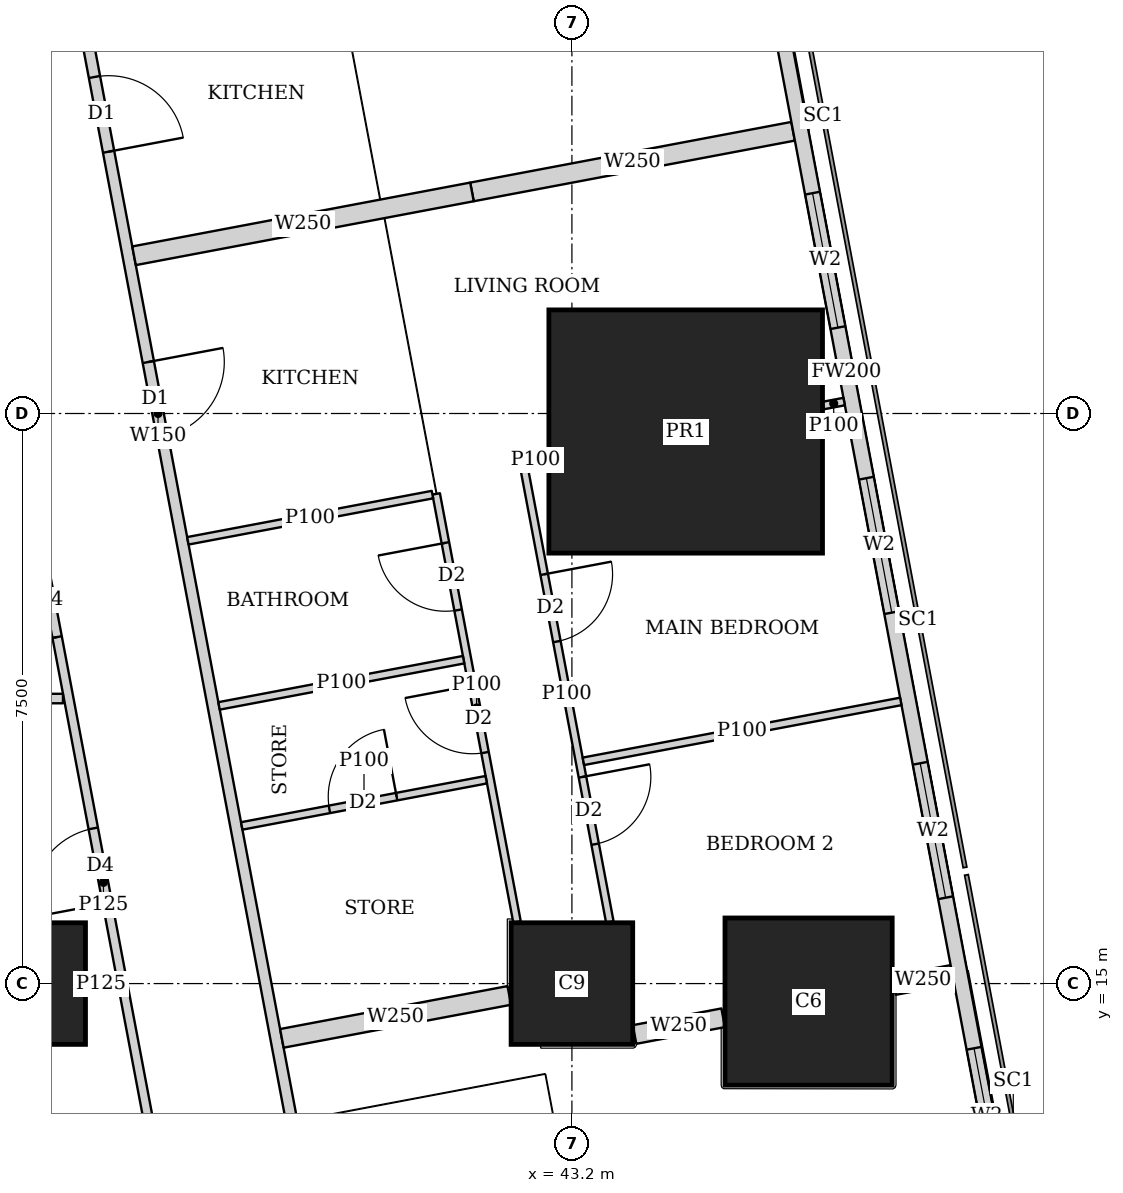
"""IFC4 building model, lengths in metres.
Left out: names, types, materials, properties, quantities, classifications, styles, units other than length and angle.
Written with IfcOpenShell. Run it as: python <this file> out.ifc"""

import sys

from ifc_helpers import new_model, si_unit, direction, frame, frame_2d, origin, origin_2d, place, context, subcontext, project, spatial, rectangle, extrude, element, fill, save


model = new_model("IFC4")
c1 = context("Model", 3, precision=1e-05, world=origin(), true_north=direction((0.0, 1.0)))
c2 = subcontext(c1, "Body", "Model", "MODEL_VIEW")
j1 = project(units=[si_unit("LENGTHUNIT", "METRE"), si_unit("PLANEANGLEUNIT", "RADIAN")], contexts=[c1])
p1 = place(None, origin())
s1 = spatial("IfcSite", under=j1, at=p1, CompositionType="ELEMENT")
p2 = place(p1, origin())
s2 = spatial("IfcBuilding", under=s1, at=p2, CompositionType="ELEMENT")
p3 = place(p2, frame((0.0, 0.0, 81.65)))
s3 = spatial("IfcBuildingStorey", under=s2, at=p3, CompositionType="ELEMENT", Elevation=81.65)
for number, where, z_axis, x_axis in (
    (1, (36.0, 15.0, 0.0), (0.0, 0.0, 1.0), (1.0, 0.0, 0.0)),
    (2, (43.2, 15.0, 0.0), (0.0, 0.0, 1.0), (1.0, 0.0, 0.0)),
):
    element("IfcColumn", number, at=place(p3, frame(where, z_axis=z_axis, x_axis=x_axis)), inside=s3, PredefinedType="COLUMN", context=c2, shape_type="SweptSolid", body=[
        extrude(rectangle(XDim=1.6, YDim=1.6, at=origin_2d()), origin(), (0.0, 0.0, 1.0), 3.75),
    ])
p4 = place(p3, frame((46.314, 14.763, 0.0), z_axis=(0.0, 0.0, 1.0), x_axis=(1.0, 0.0, 0.0)))
e3 = element("IfcColumn", 3, at=p4, inside=s3, PredefinedType="COLUMN", context=c2, shape_type="SweptSolid", body=[
    extrude(rectangle(XDim=2.2, YDim=2.2, at=origin_2d()), origin(), (0.0, 0.0, 1.0), 3.75),
])
p5 = place(p3, frame((44.697, 22.263, 0.0), z_axis=(0.0, 0.0, 1.0), x_axis=(1.0, 0.0, 0.0)))
e4 = element("IfcColumn", 4, at=p5, inside=s3, PredefinedType="COLUMN", context=c2, shape_type="SweptSolid", body=[
    extrude(rectangle(XDim=3.6, YDim=3.2, at=origin_2d()), origin(), (0.0, 0.0, 1.0), 3.75),
])
p6 = place(p3, frame((50.653, 2.703, 0.0), z_axis=(0.0, 0.0, 1.0), x_axis=(-0.185612026696, 0.982623109613, 0.0)))
e5 = element("IfcWall", 5, at=p6, inside=s3, PredefinedType="SOLIDWALL", context=c2, shape_type="SweptSolid", body=[
    extrude(rectangle(XDim=41.393, YDim=0.2, at=frame_2d((20.697, 0.0))), origin(), (0.0, 0.0, 1.0), 3.5),
])
p7 = place(p6, frame((1.633, 0.0, 0.9)))
e6 = element("IfcOpeningElement", 6, at=p7, cuts=e5, PredefinedType="OPENING", context=c2, shape_type="SweptSolid", body=[
    extrude(rectangle(XDim=1.8, YDim=1.5, at=frame_2d((0.9, 0.75))), frame((0.0, 0.11, 0.0), z_axis=(0.0, -1.0, 0.0), x_axis=(1.0, 0.0, 0.0)), (0.0, 0.0, 1.0), 0.22),
])
p8 = place(p6, frame((6.032, 0.0, 0.9)))
e7 = element("IfcOpeningElement", 7, at=p8, cuts=e5, PredefinedType="OPENING", context=c2, shape_type="SweptSolid", body=[
    extrude(rectangle(XDim=1.8, YDim=1.5, at=frame_2d((0.9, 0.75))), frame((0.0, 0.11, 0.0), z_axis=(0.0, -1.0, 0.0), x_axis=(1.0, 0.0, 0.0)), (0.0, 0.0, 1.0), 0.22),
])
p9 = place(p6, frame((9.848, 0.0, 0.9)))
e8 = element("IfcOpeningElement", 8, at=p9, cuts=e5, PredefinedType="OPENING", context=c2, shape_type="SweptSolid", body=[
    extrude(rectangle(XDim=1.8, YDim=1.5, at=frame_2d((0.9, 0.75))), frame((0.0, 0.11, 0.0), z_axis=(0.0, -1.0, 0.0), x_axis=(1.0, 0.0, 0.0)), (0.0, 0.0, 1.0), 0.22),
])
p10 = place(p6, frame((13.664, 0.0, 0.9)))
e9 = element("IfcOpeningElement", 9, at=p10, cuts=e5, PredefinedType="OPENING", context=c2, shape_type="SweptSolid", body=[
    extrude(rectangle(XDim=1.8, YDim=1.5, at=frame_2d((0.9, 0.75))), frame((0.0, 0.11, 0.0), z_axis=(0.0, -1.0, 0.0), x_axis=(1.0, 0.0, 0.0)), (0.0, 0.0, 1.0), 0.22),
])
p11 = place(p6, frame((17.481, 0.0, 0.9)))
e10 = element("IfcOpeningElement", 10, at=p11, cuts=e5, PredefinedType="OPENING", context=c2, shape_type="SweptSolid", body=[
    extrude(rectangle(XDim=1.8, YDim=1.5, at=frame_2d((0.9, 0.75))), frame((0.0, 0.11, 0.0), z_axis=(0.0, -1.0, 0.0), x_axis=(1.0, 0.0, 0.0)), (0.0, 0.0, 1.0), 0.22),
])
p12 = place(p6, frame((21.297, 0.0, 0.9)))
e11 = element("IfcOpeningElement", 11, at=p12, cuts=e5, PredefinedType="OPENING", context=c2, shape_type="SweptSolid", body=[
    extrude(rectangle(XDim=1.8, YDim=1.5, at=frame_2d((0.9, 0.75))), frame((0.0, 0.11, 0.0), z_axis=(0.0, -1.0, 0.0), x_axis=(1.0, 0.0, 0.0)), (0.0, 0.0, 1.0), 0.22),
])
p13 = place(p6, frame((25.113, 0.0, 0.9)))
e12 = element("IfcOpeningElement", 12, at=p13, cuts=e5, PredefinedType="OPENING", context=c2, shape_type="SweptSolid", body=[
    extrude(rectangle(XDim=1.8, YDim=1.5, at=frame_2d((0.9, 0.75))), frame((0.0, 0.11, 0.0), z_axis=(0.0, -1.0, 0.0), x_axis=(1.0, 0.0, 0.0)), (0.0, 0.0, 1.0), 0.22),
])
p14 = place(p6, frame((28.93, 0.0, 0.9)))
e13 = element("IfcOpeningElement", 13, at=p14, cuts=e5, PredefinedType="OPENING", context=c2, shape_type="SweptSolid", body=[
    extrude(rectangle(XDim=1.8, YDim=1.5, at=frame_2d((0.9, 0.75))), frame((0.0, 0.11, 0.0), z_axis=(0.0, -1.0, 0.0), x_axis=(1.0, 0.0, 0.0)), (0.0, 0.0, 1.0), 0.22),
])
p15 = place(p6, frame((32.746, 0.0, 0.9)))
e14 = element("IfcOpeningElement", 14, at=p15, cuts=e5, PredefinedType="OPENING", context=c2, shape_type="SweptSolid", body=[
    extrude(rectangle(XDim=1.8, YDim=1.5, at=frame_2d((0.9, 0.75))), frame((0.0, 0.11, 0.0), z_axis=(0.0, -1.0, 0.0), x_axis=(1.0, 0.0, 0.0)), (0.0, 0.0, 1.0), 0.22),
])
p16 = place(p6, frame((36.481, 0.0, 0.9)))
e15 = element("IfcOpeningElement", 15, at=p16, cuts=e5, PredefinedType="OPENING", context=c2, shape_type="SweptSolid", body=[
    extrude(rectangle(XDim=1.8, YDim=1.5, at=frame_2d((0.9, 0.75))), frame((0.0, 0.11, 0.0), z_axis=(0.0, -1.0, 0.0), x_axis=(1.0, 0.0, 0.0)), (0.0, 0.0, 1.0), 0.22),
])
p17 = place(p3, frame((33.382, 45.65, 0.0), z_axis=(0.0, 0.0, 1.0), x_axis=(0.185593544777, -0.982626600565, 0.0)))
e16 = element("IfcWall", 16, at=p17, inside=s3, PredefinedType="SOLIDWALL", context=c2, shape_type="SweptSolid", body=[
    extrude(rectangle(XDim=47.118, YDim=0.15, at=frame_2d((23.559, 0.0))), origin(), (0.0, 0.0, 1.0), 2.2),
])
p18 = place(p17, frame((19.054, 0.0, 0.0)))
e17 = element("IfcOpeningElement", 17, at=p18, cuts=e16, PredefinedType="OPENING", context=c2, shape_type="SweptSolid", body=[
    extrude(rectangle(XDim=1.0, YDim=2.1, at=frame_2d((0.5, 1.05))), frame((0.0, 0.085, 0.0), z_axis=(0.0, -1.0, 0.0), x_axis=(1.0, 0.0, 0.0)), (0.0, 0.0, 1.0), 0.17),
])
p19 = place(p17, frame((22.87, 0.0, 0.0)))
e18 = element("IfcOpeningElement", 18, at=p19, cuts=e16, PredefinedType="OPENING", context=c2, shape_type="SweptSolid", body=[
    extrude(rectangle(XDim=1.0, YDim=2.1, at=frame_2d((0.5, 1.05))), frame((0.0, 0.085, 0.0), z_axis=(0.0, -1.0, 0.0), x_axis=(1.0, 0.0, 0.0)), (0.0, 0.0, 1.0), 0.17),
])
p20 = place(p17, frame((33.833, 0.0, 0.0)))
e19 = element("IfcOpeningElement", 19, at=p20, cuts=e16, PredefinedType="OPENING", context=c2, shape_type="SweptSolid", body=[
    extrude(rectangle(XDim=1.0, YDim=2.1, at=frame_2d((0.5, 1.05))), frame((0.0, 0.085, 0.0), z_axis=(0.0, -1.0, 0.0), x_axis=(1.0, 0.0, 0.0)), (0.0, 0.0, 1.0), 0.17),
])
p21 = place(p3, frame((42.566, 21.809, 0.0), z_axis=(0.0, 0.0, 1.0), x_axis=(0.18559218796, -0.982626856832, 0.0)))
e20 = element("IfcWall", 20, at=p21, inside=s3, PredefinedType="PARTITIONING", context=c2, shape_type="SweptSolid", body=[
    extrude(rectangle(XDim=6.105, YDim=0.1, at=frame_2d((3.052, 0.0))), origin(), (0.0, 0.0, 1.0), 2.5),
])
p22 = place(p21, frame((1.45, 0.0, 0.0)))
e21 = element("IfcOpeningElement", 21, at=p22, cuts=e20, PredefinedType="OPENING", context=c2, shape_type="SweptSolid", body=[
    extrude(rectangle(XDim=0.9, YDim=2.1, at=frame_2d((0.45, 1.05))), frame((0.0, 0.06, 0.0), z_axis=(0.0, -1.0, 0.0), x_axis=(1.0, 0.0, 0.0)), (0.0, 0.0, 1.0), 0.12),
])
p23 = place(p21, frame((4.163, 0.0, 0.0)))
e22 = element("IfcOpeningElement", 22, at=p23, cuts=e20, PredefinedType="OPENING", context=c2, shape_type="SweptSolid", body=[
    extrude(rectangle(XDim=0.9, YDim=2.1, at=frame_2d((0.45, 1.05))), frame((0.0, 0.06, 0.0), z_axis=(0.0, -1.0, 0.0), x_axis=(1.0, 0.0, 0.0)), (0.0, 0.0, 1.0), 0.12),
])
p24 = place(p3, frame((41.414, 21.442, 0.0), z_axis=(0.0, 0.0, 1.0), x_axis=(0.185636022079, -0.982618576716, 0.0)))
e23 = element("IfcWall", 23, at=p24, inside=s3, PredefinedType="PARTITIONING", context=c2, shape_type="SweptSolid", body=[
    extrude(rectangle(XDim=5.731, YDim=0.1, at=frame_2d((2.866, 0.0))), origin(), (0.0, 0.0, 1.0), 3.5),
])
p25 = place(p24, frame((0.655, 0.0, 0.0)))
e24 = element("IfcOpeningElement", 24, at=p25, cuts=e23, PredefinedType="OPENING", context=c2, shape_type="SweptSolid", body=[
    extrude(rectangle(XDim=0.9, YDim=2.1, at=frame_2d((0.45, 1.05))), frame((0.0, 0.06, 0.0), z_axis=(0.0, -1.0, 0.0), x_axis=(1.0, 0.0, 0.0)), (0.0, 0.0, 1.0), 0.12),
])
p26 = place(p24, frame((2.563, 0.0, 0.0)))
e25 = element("IfcOpeningElement", 25, at=p26, cuts=e23, PredefinedType="OPENING", context=c2, shape_type="SweptSolid", body=[
    extrude(rectangle(XDim=0.9, YDim=2.1, at=frame_2d((0.45, 1.05))), frame((0.0, 0.06, 0.0), z_axis=(0.0, -1.0, 0.0), x_axis=(1.0, 0.0, 0.0)), (0.0, 0.0, 1.0), 0.12),
])
p27 = place(p3, frame((46.782, 22.657, 0.0), z_axis=(0.0, 0.0, 1.0), x_axis=(-0.982574553168, -0.185868898601, 0.0)))
e26 = element("IfcWall", 26, at=p27, inside=s3, PredefinedType="PARTITIONING", context=c2, shape_type="SweptSolid", body=[
    extrude(rectangle(XDim=0.28, YDim=0.1, at=frame_2d((0.14, 0.0))), origin(), (0.0, 0.0, 1.0), 3.5),
])
p28 = place(p3, frame((42.887, 21.921, 0.0), z_axis=(0.0, 0.0, 1.0), x_axis=(-0.982274918032, -0.187445953293, 0.0)))
e27 = element("IfcWall", 27, at=p28, inside=s3, PredefinedType="PARTITIONING", context=c2, shape_type="SweptSolid", body=[
    extrude(rectangle(XDim=0.336, YDim=0.1, at=frame_2d((0.168, 0.0))), origin(), (0.0, 0.0, 1.0), 2.5),
])
p29 = place(p3, frame((47.527, 18.712, 0.0), z_axis=(0.0, 0.0, 1.0), x_axis=(-0.982665405803, -0.185387972203, 0.0)))
e28 = element("IfcWall", 28, at=p29, inside=s3, PredefinedType="PARTITIONING", context=c2, shape_type="SweptSolid", body=[
    extrude(rectangle(XDim=4.25, YDim=0.1, at=frame_2d((2.125, 0.0))), origin(), (0.0, 0.0, 1.0), 2.2),
])
p30 = place(p3, frame((41.365, 21.433, 0.0), z_axis=(0.0, 0.0, 1.0), x_axis=(-0.982607026909, -0.185697147715, 0.0)))
e29 = element("IfcWall", 29, at=p30, inside=s3, PredefinedType="PARTITIONING", context=c2, shape_type="SweptSolid", body=[
    extrude(rectangle(XDim=3.275, YDim=0.1, at=frame_2d((1.637, 0.0))), origin(), (0.0, 0.0, 1.0), 3.5),
])
p31 = place(p3, frame((42.073, 17.682, 0.0), z_axis=(0.0, 0.0, 1.0), x_axis=(-0.982610347627, -0.185679575441, 0.0)))
e30 = element("IfcWall", 30, at=p31, inside=s3, PredefinedType="PARTITIONING", context=c2, shape_type="SweptSolid", body=[
    extrude(rectangle(XDim=3.274, YDim=0.1, at=frame_2d((1.637, 0.0))), origin(), (0.0, 0.0, 1.0), 3.5),
])
p32 = place(p31, frame((1.2, 0.0, 0.0)))
e31 = element("IfcOpeningElement", 31, at=p32, cuts=e30, PredefinedType="OPENING", context=c2, shape_type="SweptSolid", body=[
    extrude(rectangle(XDim=0.9, YDim=2.1, at=frame_2d((0.45, 1.05))), frame((0.0, 0.06, 0.0), z_axis=(0.0, -1.0, 0.0), x_axis=(1.0, 0.0, 0.0)), (0.0, 0.0, 1.0), 0.12),
])
p33 = place(p3, frame((41.775, 19.261, 0.0), z_axis=(0.0, 0.0, 1.0), x_axis=(-0.982620626894, -0.185625169636, 0.0)))
e32 = element("IfcWall", 32, at=p33, inside=s3, PredefinedType="PARTITIONING", context=c2, shape_type="SweptSolid", body=[
    extrude(rectangle(XDim=3.275, YDim=0.1, at=frame_2d((1.637, 0.0))), origin(), (0.0, 0.0, 1.0), 3.5),
])
p34 = place(p3, frame((46.11, 26.213, 0.0), z_axis=(0.0, 0.0, 1.0), x_axis=(-0.982633535512, -0.185556823879, 0.0)))
e33 = element("IfcWall", 33, at=p34, inside=s3, PredefinedType="SOLIDWALL", context=c2, shape_type="SweptSolid", body=[
    extrude(rectangle(XDim=4.3, YDim=0.25, at=frame_2d((2.15, 0.0))), origin(), (0.0, 0.0, 1.0), 2.2),
])
p35 = place(p3, frame((41.885, 25.415, 0.0), z_axis=(0.0, 0.0, 1.0), x_axis=(-0.982612837616, -0.185666398014, 0.0)))
e34 = element("IfcWall", 34, at=p35, inside=s3, PredefinedType="SOLIDWALL", context=c2, shape_type="SweptSolid", body=[
    extrude(rectangle(XDim=4.525, YDim=0.25, at=frame_2d((2.262, 0.0))), origin(), (0.0, 0.0, 1.0), 3.5),
])
p36 = place(p3, frame((48.206, 15.12, 0.0), z_axis=(0.0, 0.0, 1.0), x_axis=(-0.982638023929, -0.185533053469, 0.0)))
e35 = element("IfcWall", 35, at=p36, inside=s3, PredefinedType="SOLIDWALL", context=c2, shape_type="SweptSolid", body=[
    extrude(rectangle(XDim=0.782, YDim=0.25, at=frame_2d((0.391, 0.0))), origin(), (0.0, 0.0, 1.0), 3.5),
])
p37 = place(p3, frame((45.19, 14.55, 0.0), z_axis=(0.0, 0.0, 1.0), x_axis=(-0.982666604435, -0.185381618634, 0.0)))
e36 = element("IfcWall", 36, at=p37, inside=s3, PredefinedType="SOLIDWALL", context=c2, shape_type="SweptSolid", body=[
    extrude(rectangle(XDim=1.187, YDim=0.25, at=frame_2d((0.593, 0.0))), origin(), (0.0, 0.0, 1.0), 3.5),
])
p38 = place(p3, frame((42.376, 14.844, 0.0), z_axis=(0.0, 0.0, 1.0), x_axis=(-0.982636286056, -0.185542257522, 0.0)))
e37 = element("IfcWall", 37, at=p38, inside=s3, PredefinedType="SOLIDWALL", context=c2, shape_type="SweptSolid", body=[
    extrude(rectangle(XDim=3.045, YDim=0.25, at=frame_2d((1.522, 0.0))), origin(), (0.0, 0.0, 1.0), 3.5),
])
p39 = place(p3, frame((38.202, 10.163, 0.0), z_axis=(0.0, 0.0, 1.0), x_axis=(-0.185645577403, 0.982616771479, 0.0)))
e38 = element("IfcWall", 38, at=p39, inside=s3, PredefinedType="PARTITIONING", context=c2, shape_type="SweptSolid", body=[
    extrude(rectangle(XDim=12.555, YDim=0.125, at=frame_2d((6.278, 0.0))), origin(), (0.0, 0.0, 1.0), 2.5),
])
p40 = place(p39, frame((0.708, 0.0, 0.0)))
e39 = element("IfcOpeningElement", 39, at=p40, cuts=e38, PredefinedType="OPENING", context=c2, shape_type="SweptSolid", body=[
    extrude(rectangle(XDim=1.0, YDim=2.1, at=frame_2d((0.5, 1.05))), frame((0.0, 0.073, 0.0), z_axis=(0.0, -1.0, 0.0), x_axis=(1.0, 0.0, 0.0)), (0.0, 0.0, 1.0), 0.145),
])
p41 = place(p39, frame((6.0, 0.0, 0.0)))
e40 = element("IfcOpeningElement", 40, at=p41, cuts=e38, PredefinedType="OPENING", context=c2, shape_type="SweptSolid", body=[
    extrude(rectangle(XDim=1.0, YDim=2.1, at=frame_2d((0.5, 1.05))), frame((0.0, 0.073, 0.0), z_axis=(0.0, -1.0, 0.0), x_axis=(1.0, 0.0, 0.0)), (0.0, 0.0, 1.0), 0.145),
])
p42 = place(p39, frame((9.562, 0.0, 0.0)))
e41 = element("IfcOpeningElement", 41, at=p42, cuts=e38, PredefinedType="OPENING", context=c2, shape_type="SweptSolid", body=[
    extrude(rectangle(XDim=1.0, YDim=2.1, at=frame_2d((0.5, 1.05))), frame((0.0, 0.073, 0.0), z_axis=(0.0, -1.0, 0.0), x_axis=(1.0, 0.0, 0.0)), (0.0, 0.0, 1.0), 0.145),
])
p43 = place(p3, frame((36.801, 15.0, 0.0), z_axis=(0.0, 0.0, 1.0), x_axis=(1.0, 0.0, 0.0)))
e42 = element("IfcWall", 42, at=p43, inside=s3, PredefinedType="PARTITIONING", context=c2, shape_type="SweptSolid", body=[
    extrude(rectangle(XDim=0.412, YDim=0.125, at=frame_2d((0.206, 0.0))), origin(), (0.0, 0.0, 1.0), 3.5),
])
p44 = place(p3, frame((29.25, 18.75, 0.0), z_axis=(0.0, 0.0, 1.0), x_axis=(1.0, 0.0, 0.0)))
e43 = element("IfcWall", 43, at=p44, inside=s3, PredefinedType="PARTITIONING", context=c2, shape_type="SweptSolid", body=[
    extrude(rectangle(XDim=7.254, YDim=0.125, at=frame_2d((3.627, 0.0))), origin(), (0.0, 0.0, 1.0), 3.5),
])
p45 = place(p9, origin())
e44 = element("IfcWindow", 44, at=p45, inside=s3, PartitioningType="SINGLE_PANEL", PredefinedType="WINDOW", context=c2, shape_type="SweptSolid", body=[
    extrude(rectangle(XDim=1.8, YDim=1.5, at=frame_2d((0.9, 0.75))), frame((0.0, 0.03, 0.0), z_axis=(0.0, -1.0, 0.0), x_axis=(1.0, 0.0, 0.0)), (0.0, 0.0, 1.0), 0.06),
])
fill(e8, e44)
p46 = place(p10, origin())
e45 = element("IfcWindow", 45, at=p46, inside=s3, PartitioningType="SINGLE_PANEL", PredefinedType="WINDOW", context=c2, shape_type="SweptSolid", body=[
    extrude(rectangle(XDim=1.8, YDim=1.5, at=frame_2d((0.9, 0.75))), frame((0.0, 0.03, 0.0), z_axis=(0.0, -1.0, 0.0), x_axis=(1.0, 0.0, 0.0)), (0.0, 0.0, 1.0), 0.06),
])
fill(e9, e45)
p47 = place(p11, origin())
e46 = element("IfcWindow", 46, at=p47, inside=s3, PartitioningType="SINGLE_PANEL", PredefinedType="WINDOW", context=c2, shape_type="SweptSolid", body=[
    extrude(rectangle(XDim=1.8, YDim=1.5, at=frame_2d((0.9, 0.75))), frame((0.0, 0.03, 0.0), z_axis=(0.0, -1.0, 0.0), x_axis=(1.0, 0.0, 0.0)), (0.0, 0.0, 1.0), 0.06),
])
fill(e10, e46)
p48 = place(p12, origin())
e47 = element("IfcWindow", 47, at=p48, inside=s3, PartitioningType="SINGLE_PANEL", PredefinedType="WINDOW", context=c2, shape_type="SweptSolid", body=[
    extrude(rectangle(XDim=1.8, YDim=1.5, at=frame_2d((0.9, 0.75))), frame((0.0, 0.03, 0.0), z_axis=(0.0, -1.0, 0.0), x_axis=(1.0, 0.0, 0.0)), (0.0, 0.0, 1.0), 0.06),
])
fill(e11, e47)
p49 = place(p18, origin())
e48 = element("IfcDoor", 48, at=p49, inside=s3, OperationType="SINGLE_SWING_RIGHT", PredefinedType="DOOR", context=c2, shape_type="SweptSolid", body=[
    extrude(rectangle(XDim=1.0, YDim=2.1, at=frame_2d((0.5, 1.05))), frame((0.0, 0.025, 0.0), z_axis=(0.0, -1.0, 0.0), x_axis=(1.0, 0.0, 0.0)), (0.0, 0.0, 1.0), 0.05),
])
fill(e17, e48)
p50 = place(p22, origin())
e49 = element("IfcDoor", 49, at=p50, inside=s3, OperationType="SINGLE_SWING_LEFT", PredefinedType="DOOR", context=c2, shape_type="SweptSolid", body=[
    extrude(rectangle(XDim=0.9, YDim=2.1, at=frame_2d((0.45, 1.05))), frame((0.0, 0.025, 0.0), z_axis=(0.0, -1.0, 0.0), x_axis=(1.0, 0.0, 0.0)), (0.0, 0.0, 1.0), 0.05),
])
fill(e21, e49)
p51 = place(p23, origin())
e50 = element("IfcDoor", 50, at=p51, inside=s3, OperationType="SINGLE_SWING_LEFT", PredefinedType="DOOR", context=c2, shape_type="SweptSolid", body=[
    extrude(rectangle(XDim=0.9, YDim=2.1, at=frame_2d((0.45, 1.05))), frame((0.0, 0.025, 0.0), z_axis=(0.0, -1.0, 0.0), x_axis=(1.0, 0.0, 0.0)), (0.0, 0.0, 1.0), 0.05),
])
fill(e22, e50)
p52 = place(p25, origin())
e51 = element("IfcDoor", 51, at=p52, inside=s3, OperationType="SINGLE_SWING_RIGHT", PredefinedType="DOOR", context=c2, shape_type="SweptSolid", body=[
    extrude(rectangle(XDim=0.9, YDim=2.1, at=frame_2d((0.45, 1.05))), frame((0.0, 0.025, 0.0), z_axis=(0.0, -1.0, 0.0), x_axis=(1.0, 0.0, 0.0)), (0.0, 0.0, 1.0), 0.05),
])
fill(e24, e51)
p53 = place(p26, origin())
e52 = element("IfcDoor", 52, at=p53, inside=s3, OperationType="SINGLE_SWING_RIGHT", PredefinedType="DOOR", context=c2, shape_type="SweptSolid", body=[
    extrude(rectangle(XDim=0.9, YDim=2.1, at=frame_2d((0.45, 1.05))), frame((0.0, 0.025, 0.0), z_axis=(0.0, -1.0, 0.0), x_axis=(1.0, 0.0, 0.0)), (0.0, 0.0, 1.0), 0.05),
])
fill(e25, e52)
p54 = place(p19, origin())
e53 = element("IfcDoor", 53, at=p54, inside=s3, OperationType="SINGLE_SWING_LEFT", PredefinedType="DOOR", context=c2, shape_type="SweptSolid", body=[
    extrude(rectangle(XDim=1.0, YDim=2.1, at=frame_2d((0.5, 1.05))), frame((0.0, 0.025, 0.0), z_axis=(0.0, -1.0, 0.0), x_axis=(1.0, 0.0, 0.0)), (0.0, 0.0, 1.0), 0.05),
])
fill(e18, e53)
p55 = place(p32, origin())
e54 = element("IfcDoor", 54, at=p55, inside=s3, OperationType="SINGLE_SWING_RIGHT", PredefinedType="DOOR", context=c2, shape_type="SweptSolid", body=[
    extrude(rectangle(XDim=0.9, YDim=2.1, at=frame_2d((0.45, 1.05))), frame((0.0, 0.025, 0.0), z_axis=(0.0, -1.0, 0.0), x_axis=(1.0, 0.0, 0.0)), (0.0, 0.0, 1.0), 0.05),
])
fill(e31, e54)
p56 = place(p41, origin())
e55 = element("IfcDoor", 55, at=p56, inside=s3, OperationType="SINGLE_SWING_LEFT", PredefinedType="DOOR", context=c2, shape_type="SweptSolid", body=[
    extrude(rectangle(XDim=1.0, YDim=2.1, at=frame_2d((0.5, 1.05))), frame((0.0, 0.025, 0.0), z_axis=(0.0, -1.0, 0.0), x_axis=(1.0, 0.0, 0.0)), (0.0, 0.0, 1.0), 0.05),
])
fill(e40, e55)
p57 = place(p42, origin())
e56 = element("IfcDoor", 56, at=p57, inside=s3, OperationType="SINGLE_SWING_LEFT", PredefinedType="DOOR", context=c2, shape_type="SweptSolid", body=[
    extrude(rectangle(XDim=1.0, YDim=2.1, at=frame_2d((0.5, 1.05))), frame((0.0, 0.025, 0.0), z_axis=(0.0, -1.0, 0.0), x_axis=(1.0, 0.0, 0.0)), (0.0, 0.0, 1.0), 0.05),
])
fill(e41, e56)
save(model, sys.argv[1])
